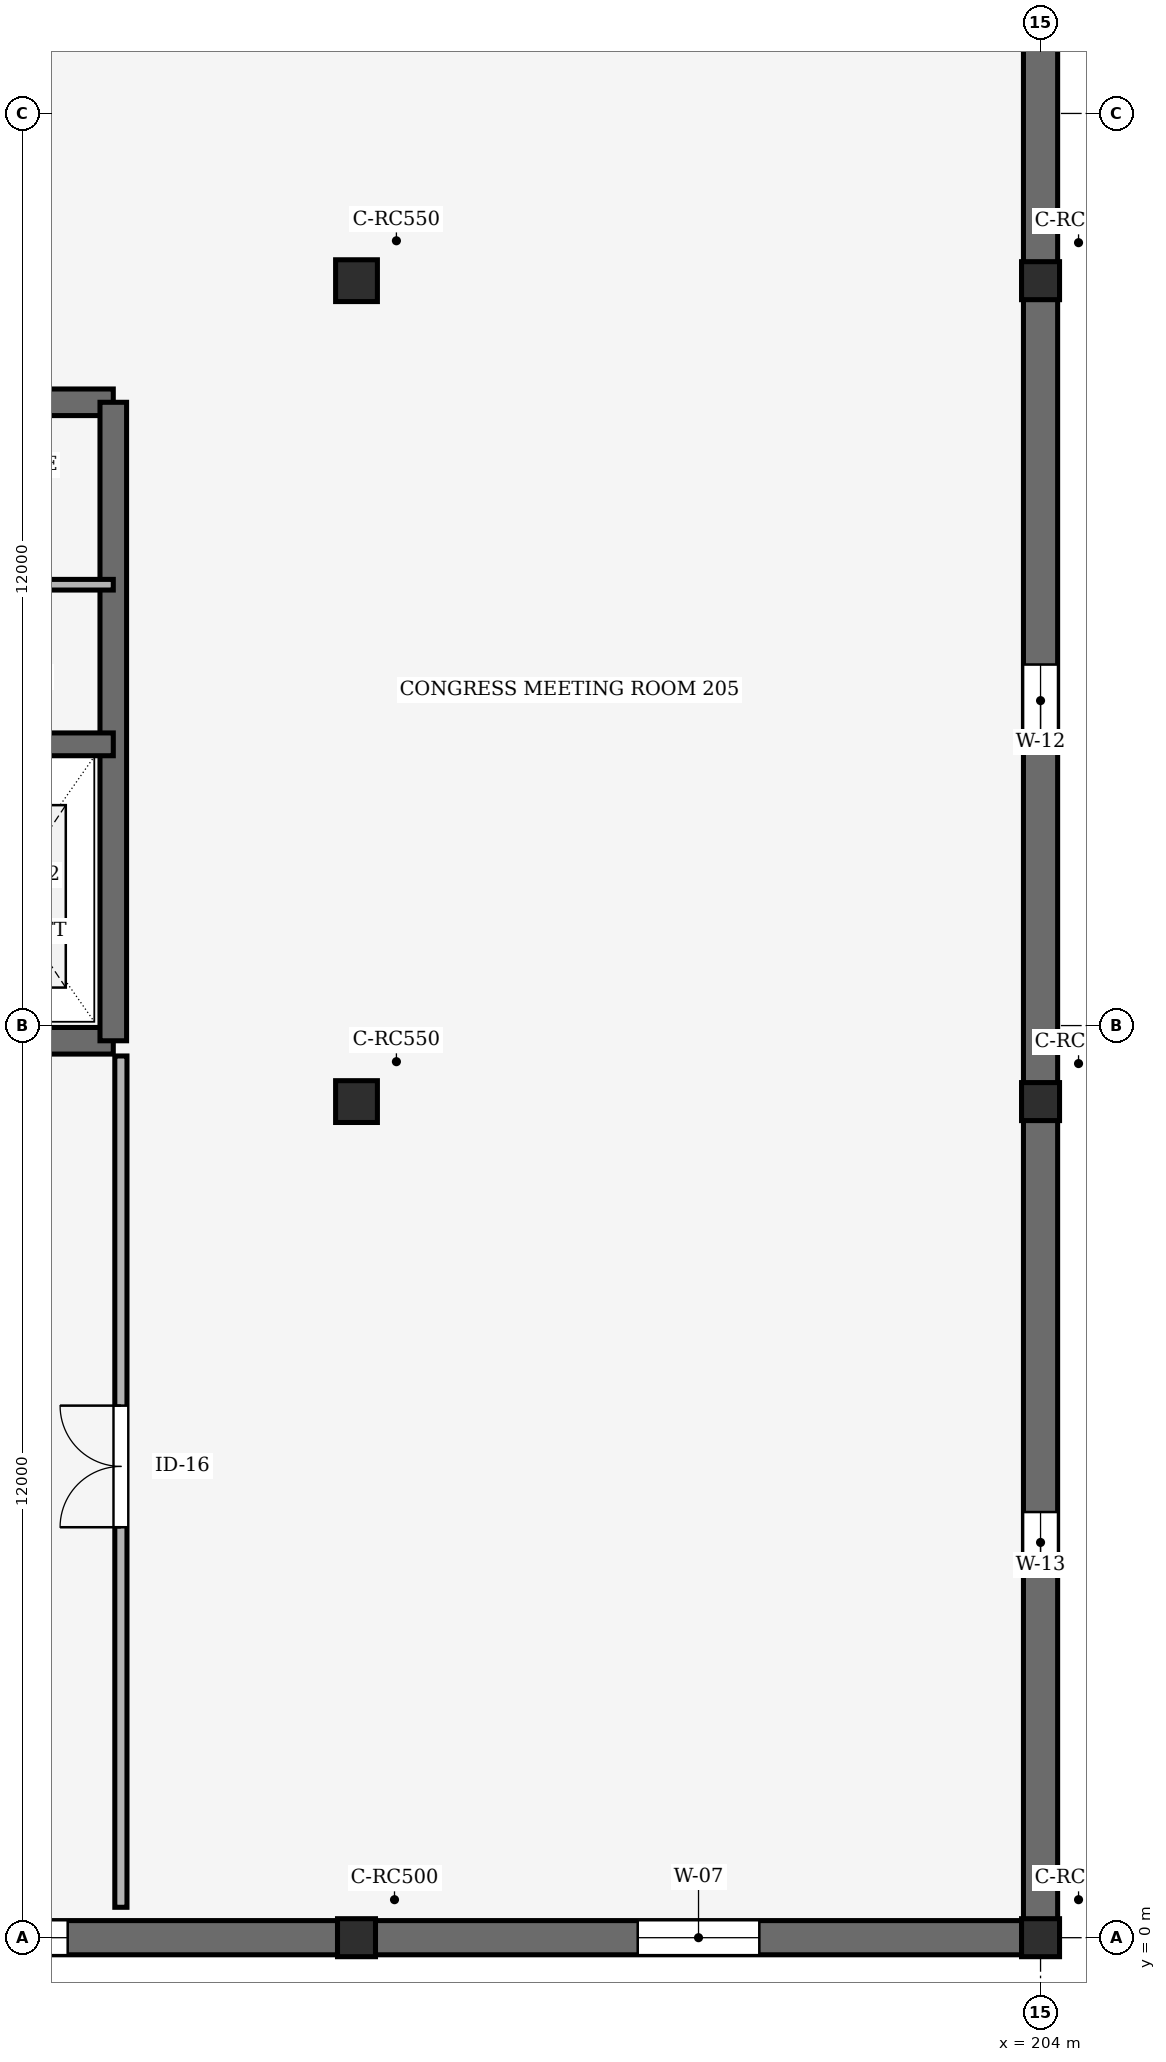
"""IFC4 building model, lengths in metres.
Left out: names, types, materials, properties, quantities, classifications, styles, units other than length and angle.
Written with IfcOpenShell. Run it as: python <this file> out.ifc"""

import sys

from ifc_helpers import new_model, si_unit, direction, frame, frame_2d, origin, origin_2d, place, context, subcontext, project, spatial, rectangle, extrude, element, fill, save


model = new_model("IFC4")
c1 = context("Model", 3, precision=1e-05, world=origin(), true_north=direction((0.0, 1.0)))
c2 = subcontext(c1, "Body", "Model", "MODEL_VIEW")
j1 = project(units=[si_unit("LENGTHUNIT", "METRE"), si_unit("PLANEANGLEUNIT", "RADIAN")], contexts=[c1])
p1 = place(None, origin())
s1 = spatial("IfcSite", under=j1, at=p1, CompositionType="ELEMENT")
p2 = place(p1, origin())
s2 = spatial("IfcBuilding", under=s1, at=p2, CompositionType="ELEMENT")
p3 = place(p2, frame((0.0, 0.0, 10.8)))
s3 = spatial("IfcBuildingStorey", under=s2, at=p3, CompositionType="ELEMENT", Elevation=10.8)
p4 = place(p3, frame((195.0, 0.0, 0.0), z_axis=(0.0, 0.0, 1.0), x_axis=(1.0, 0.0, 0.0)))
e1 = element("IfcColumn", 1, at=p4, inside=s3, PredefinedType="COLUMN", context=c2, shape_type="SweptSolid", body=[
    extrude(rectangle(XDim=0.5, YDim=0.5, at=origin_2d()), origin(), (0.0, 0.0, 1.0), 5.4),
])
for number, where, z_axis, x_axis in (
    (2, (195.0, 11.0, 0.0), (0.0, 0.0, 1.0), (1.0, 0.0, 0.0)),
    (3, (195.0, 21.8, 0.0), (0.0, 0.0, 1.0), (1.0, 0.0, 0.0)),
):
    element("IfcColumn", number, at=place(p3, frame(where, z_axis=z_axis, x_axis=x_axis)), inside=s3, PredefinedType="COLUMN", context=c2, shape_type="SweptSolid", body=[
        extrude(rectangle(XDim=0.55, YDim=0.55, at=origin_2d()), origin(), (0.0, 0.0, 1.0), 5.4),
    ])
for number, where, z_axis, x_axis in (
    (4, (204.0, 0.0, 0.0), (0.0, 0.0, 1.0), (1.0, 0.0, 0.0)),
    (5, (204.0, 11.0, 0.0), (0.0, 0.0, 1.0), (1.0, 0.0, 0.0)),
    (6, (204.0, 21.8, 0.0), (0.0, 0.0, 1.0), (1.0, 0.0, 0.0)),
):
    element("IfcColumn", number, at=place(p3, frame(where, z_axis=z_axis, x_axis=x_axis)), inside=s3, PredefinedType="COLUMN", context=c2, shape_type="SweptSolid", body=[
        extrude(rectangle(XDim=0.5, YDim=0.5, at=origin_2d()), origin(), (0.0, 0.0, 1.0), 5.4),
    ])
p5 = place(p3, frame((186.0, 0.0, 0.0), z_axis=(0.0, 0.0, 1.0), x_axis=(1.0, 0.0, 0.0)))
e7 = element("IfcWall", 7, at=p5, inside=s3, PredefinedType="SOLIDWALL", context=c2, shape_type="SweptSolid", body=[
    extrude(rectangle(XDim=9.0, YDim=0.45, at=frame_2d((4.5, 0.0))), origin(), (0.0, 0.0, 1.0), 4.35),
])
p6 = place(p5, frame((3.8, 0.0, 0.9)))
e8 = element("IfcOpeningElement", 8, at=p6, cuts=e7, PredefinedType="OPENING", context=c2, shape_type="SweptSolid", body=[
    extrude(rectangle(XDim=1.4, YDim=2.0, at=frame_2d((0.7, 1.0))), frame((0.0, 0.235, 0.0), z_axis=(0.0, -1.0, 0.0), x_axis=(1.0, 0.0, 0.0)), (0.0, 0.0, 1.0), 0.47),
])
p7 = place(p3, frame((195.0, 0.0, 0.0), z_axis=(0.0, 0.0, 1.0), x_axis=(1.0, 0.0, 0.0)))
e9 = element("IfcWall", 9, at=p7, inside=s3, PredefinedType="SOLIDWALL", context=c2, shape_type="SweptSolid", body=[
    extrude(rectangle(XDim=9.0, YDim=0.45, at=frame_2d((4.5, 0.0))), origin(), (0.0, 0.0, 1.0), 4.35),
])
p8 = place(p7, frame((3.7, 0.0, 0.9)))
e10 = element("IfcOpeningElement", 10, at=p8, cuts=e9, PredefinedType="OPENING", context=c2, shape_type="SweptSolid", body=[
    extrude(rectangle(XDim=1.6, YDim=2.35, at=frame_2d((0.8, 1.175))), frame((0.0, 0.235, 0.0), z_axis=(0.0, -1.0, 0.0), x_axis=(1.0, 0.0, 0.0)), (0.0, 0.0, 1.0), 0.47),
])
p9 = place(p3, frame((204.0, 0.0, 0.0), z_axis=(0.0, 0.0, 1.0), x_axis=(0.0, 1.0, 0.0)))
e11 = element("IfcWall", 11, at=p9, inside=s3, PredefinedType="SOLIDWALL", context=c2, shape_type="SweptSolid", body=[
    extrude(rectangle(XDim=11.0, YDim=0.45, at=frame_2d((5.5, 0.0))), origin(), (0.0, 0.0, 1.0), 4.35),
])
p10 = place(p9, frame((4.8, 0.0, 1.0)))
e12 = element("IfcOpeningElement", 12, at=p10, cuts=e11, PredefinedType="OPENING", context=c2, shape_type="SweptSolid", body=[
    extrude(rectangle(XDim=0.8, YDim=1.6, at=frame_2d((0.4, 0.8))), frame((0.0, 0.235, 0.0), z_axis=(0.0, -1.0, 0.0), x_axis=(1.0, 0.0, 0.0)), (0.0, 0.0, 1.0), 0.47),
])
p11 = place(p3, frame((204.0, 11.0, 0.0), z_axis=(0.0, 0.0, 1.0), x_axis=(0.0, 1.0, 0.0)))
e13 = element("IfcWall", 13, at=p11, inside=s3, PredefinedType="SOLIDWALL", context=c2, shape_type="SweptSolid", body=[
    extrude(rectangle(XDim=10.8, YDim=0.45, at=frame_2d((5.4, 0.0))), origin(), (0.0, 0.0, 1.0), 4.35),
])
p12 = place(p11, frame((4.8, 0.0, 1.0)))
e14 = element("IfcOpeningElement", 14, at=p12, cuts=e13, PredefinedType="OPENING", context=c2, shape_type="SweptSolid", body=[
    extrude(rectangle(XDim=0.95, YDim=2.1, at=frame_2d((0.475, 1.05))), frame((0.0, 0.235, 0.0), z_axis=(0.0, -1.0, 0.0), x_axis=(1.0, 0.0, 0.0)), (0.0, 0.0, 1.0), 0.47),
])
p13 = place(p3, frame((204.0, 21.8, 0.0), z_axis=(0.0, 0.0, 1.0), x_axis=(0.0, 1.0, 0.0)))
e15 = element("IfcWall", 15, at=p13, inside=s3, PredefinedType="SOLIDWALL", context=c2, shape_type="SweptSolid", body=[
    extrude(rectangle(XDim=11.0, YDim=0.45, at=frame_2d((5.5, 0.0))), origin(), (0.0, 0.0, 1.0), 4.35),
])
p14 = place(p13, frame((4.8, 0.0, 1.0)))
e16 = element("IfcOpeningElement", 16, at=p14, cuts=e15, PredefinedType="OPENING", context=c2, shape_type="SweptSolid", body=[
    extrude(rectangle(XDim=0.8, YDim=1.6, at=frame_2d((0.4, 0.8))), frame((0.0, 0.235, 0.0), z_axis=(0.0, -1.0, 0.0), x_axis=(1.0, 0.0, 0.0)), (0.0, 0.0, 1.0), 0.47),
])
for number, where, z_axis, x_axis in (
    (17, (181.6, 11.8, 0.0), (0.0, 0.0, 1.0), (1.0, 0.0, 0.0)),
    (18, (191.8, 20.2, 0.0), (0.0, 0.0, 1.0), (-1.0, 0.0, 0.0)),
):
    element("IfcWall", number, at=place(p3, frame(where, z_axis=z_axis, x_axis=x_axis)), inside=s3, PredefinedType="SHEAR", context=c2, shape_type="SweptSolid", body=[
        extrude(rectangle(XDim=10.2, YDim=0.35, at=frame_2d((5.1, 0.0))), origin(), (0.0, 0.0, 1.0), 5.4),
    ])
p15 = place(p3, frame((191.8, 11.8, 0.0), z_axis=(0.0, 0.0, 1.0), x_axis=(0.0, 1.0, 0.0)))
e19 = element("IfcWall", 19, at=p15, inside=s3, PredefinedType="SHEAR", context=c2, shape_type="SweptSolid", body=[
    extrude(rectangle(XDim=8.4, YDim=0.35, at=frame_2d((4.2, 0.0))), origin(), (0.0, 0.0, 1.0), 5.4),
])
p16 = place(p3, frame((181.6, 15.7, 0.0), z_axis=(0.0, 0.0, 1.0), x_axis=(1.0, 0.0, 0.0)))
e20 = element("IfcWall", 20, at=p16, inside=s3, PredefinedType="SHEAR", context=c2, shape_type="SweptSolid", body=[
    extrude(rectangle(XDim=10.2, YDim=0.3, at=frame_2d((5.1, 0.0))), origin(), (0.0, 0.0, 1.0), 5.4),
])
p17 = place(p16, frame((0.28, 0.0, 0.0)))
e21 = element("IfcOpeningElement", 21, at=p17, cuts=e20, PredefinedType="OPENING", context=c2, shape_type="SweptSolid", body=[
    extrude(rectangle(XDim=1.45, YDim=2.15, at=frame_2d((0.725, 1.075))), frame((0.0, 0.16, 0.0), z_axis=(0.0, -1.0, 0.0), x_axis=(1.0, 0.0, 0.0)), (0.0, 0.0, 1.0), 0.32),
])
p18 = place(p16, frame((8.225, 0.0, 0.0)))
e22 = element("IfcOpeningElement", 22, at=p18, cuts=e20, PredefinedType="OPENING", context=c2, shape_type="SweptSolid", body=[
    extrude(rectangle(XDim=1.1, YDim=2.15, at=frame_2d((0.55, 1.075))), frame((0.0, 0.16, 0.0), z_axis=(0.0, -1.0, 0.0), x_axis=(1.0, 0.0, 0.0)), (0.0, 0.0, 1.0), 0.32),
])
p19 = place(p3, frame((181.6, 17.8, 0.0), z_axis=(0.0, 0.0, 1.0), x_axis=(1.0, 0.0, 0.0)))
e23 = element("IfcWall", 23, at=p19, inside=s3, PredefinedType="PARTITIONING", context=c2, shape_type="SweptSolid", body=[
    extrude(rectangle(XDim=10.2, YDim=0.14, at=frame_2d((5.1, 0.0))), origin(), (0.0, 0.0, 1.0), 4.435),
])
p20 = place(p19, frame((0.9, 0.0, 0.0)))
e24 = element("IfcOpeningElement", 24, at=p20, cuts=e23, PredefinedType="OPENING", context=c2, shape_type="SweptSolid", body=[
    extrude(rectangle(XDim=0.9, YDim=2.1, at=frame_2d((0.45, 1.05))), frame((0.0, 0.08, 0.0), z_axis=(0.0, -1.0, 0.0), x_axis=(1.0, 0.0, 0.0)), (0.0, 0.0, 1.0), 0.16),
])
p21 = place(p19, frame((4.3, 0.0, 0.0)))
e25 = element("IfcOpeningElement", 25, at=p21, cuts=e23, PredefinedType="OPENING", context=c2, shape_type="SweptSolid", body=[
    extrude(rectangle(XDim=0.9, YDim=2.1, at=frame_2d((0.45, 1.05))), frame((0.0, 0.08, 0.0), z_axis=(0.0, -1.0, 0.0), x_axis=(1.0, 0.0, 0.0)), (0.0, 0.0, 1.0), 0.16),
])
p22 = place(p19, frame((7.7, 0.0, 0.0)))
e26 = element("IfcOpeningElement", 26, at=p22, cuts=e23, PredefinedType="OPENING", context=c2, shape_type="SweptSolid", body=[
    extrude(rectangle(XDim=0.95, YDim=2.1, at=frame_2d((0.475, 1.05))), frame((0.0, 0.08, 0.0), z_axis=(0.0, -1.0, 0.0), x_axis=(1.0, 0.0, 0.0)), (0.0, 0.0, 1.0), 0.16),
])
p23 = place(p3, frame((191.9, 0.4, 0.0), z_axis=(0.0, 0.0, 1.0), x_axis=(0.0, 1.0, 0.0)))
e27 = element("IfcWall", 27, at=p23, inside=s3, PredefinedType="PARTITIONING", context=c2, shape_type="SweptSolid", body=[
    extrude(rectangle(XDim=11.2, YDim=0.16, at=frame_2d((5.6, 0.0))), origin(), (0.0, 0.0, 1.0), 3.6),
])
p24 = place(p23, frame((5.0, 0.0, 0.0)))
e28 = element("IfcOpeningElement", 28, at=p24, cuts=e27, PredefinedType="OPENING", context=c2, shape_type="SweptSolid", body=[
    extrude(rectangle(XDim=1.6, YDim=2.2, at=frame_2d((0.8, 1.1))), frame((0.0, 0.09, 0.0), z_axis=(0.0, -1.0, 0.0), x_axis=(1.0, 0.0, 0.0)), (0.0, 0.0, 1.0), 0.18),
])
p25 = place(p6, origin())
e29 = element("IfcWindow", 29, at=p25, inside=s3, PartitioningType="DOUBLE_PANEL_VERTICAL", PredefinedType="WINDOW", context=c2, shape_type="SweptSolid", body=[
    extrude(rectangle(XDim=1.4, YDim=2.0, at=frame_2d((0.7, 1.0))), frame((0.0, 0.03, 0.0), z_axis=(0.0, -1.0, 0.0), x_axis=(1.0, 0.0, 0.0)), (0.0, 0.0, 1.0), 0.06),
])
fill(e8, e29)
p26 = place(p8, origin())
e30 = element("IfcWindow", 30, at=p26, inside=s3, PartitioningType="DOUBLE_PANEL_VERTICAL", PredefinedType="WINDOW", context=c2, shape_type="SweptSolid", body=[
    extrude(rectangle(XDim=1.6, YDim=2.35, at=frame_2d((0.8, 1.175))), frame((0.0, 0.03, 0.0), z_axis=(0.0, -1.0, 0.0), x_axis=(1.0, 0.0, 0.0)), (0.0, 0.0, 1.0), 0.06),
])
fill(e10, e30)
p27 = place(p10, origin())
e31 = element("IfcWindow", 31, at=p27, inside=s3, PartitioningType="SINGLE_PANEL", PredefinedType="WINDOW", context=c2, shape_type="SweptSolid", body=[
    extrude(rectangle(XDim=0.8, YDim=1.6, at=frame_2d((0.4, 0.8))), frame((0.0, 0.03, 0.0), z_axis=(0.0, -1.0, 0.0), x_axis=(1.0, 0.0, 0.0)), (0.0, 0.0, 1.0), 0.06),
])
fill(e12, e31)
p28 = place(p12, origin())
e32 = element("IfcWindow", 32, at=p28, inside=s3, PartitioningType="SINGLE_PANEL", PredefinedType="WINDOW", context=c2, shape_type="SweptSolid", body=[
    extrude(rectangle(XDim=0.95, YDim=2.1, at=frame_2d((0.475, 1.05))), frame((0.0, 0.03, 0.0), z_axis=(0.0, -1.0, 0.0), x_axis=(1.0, 0.0, 0.0)), (0.0, 0.0, 1.0), 0.06),
])
fill(e14, e32)
p29 = place(p24, origin())
e33 = element("IfcDoor", 33, at=p29, inside=s3, OperationType="DOUBLE_DOOR_SINGLE_SWING", PredefinedType="DOOR", context=c2, shape_type="SweptSolid", body=[
    extrude(rectangle(XDim=1.6, YDim=2.2, at=frame_2d((0.8, 1.1))), frame((0.0, 0.025, 0.0), z_axis=(0.0, -1.0, 0.0), x_axis=(1.0, 0.0, 0.0)), (0.0, 0.0, 1.0), 0.05),
])
fill(e28, e33)
save(model, sys.argv[1])
